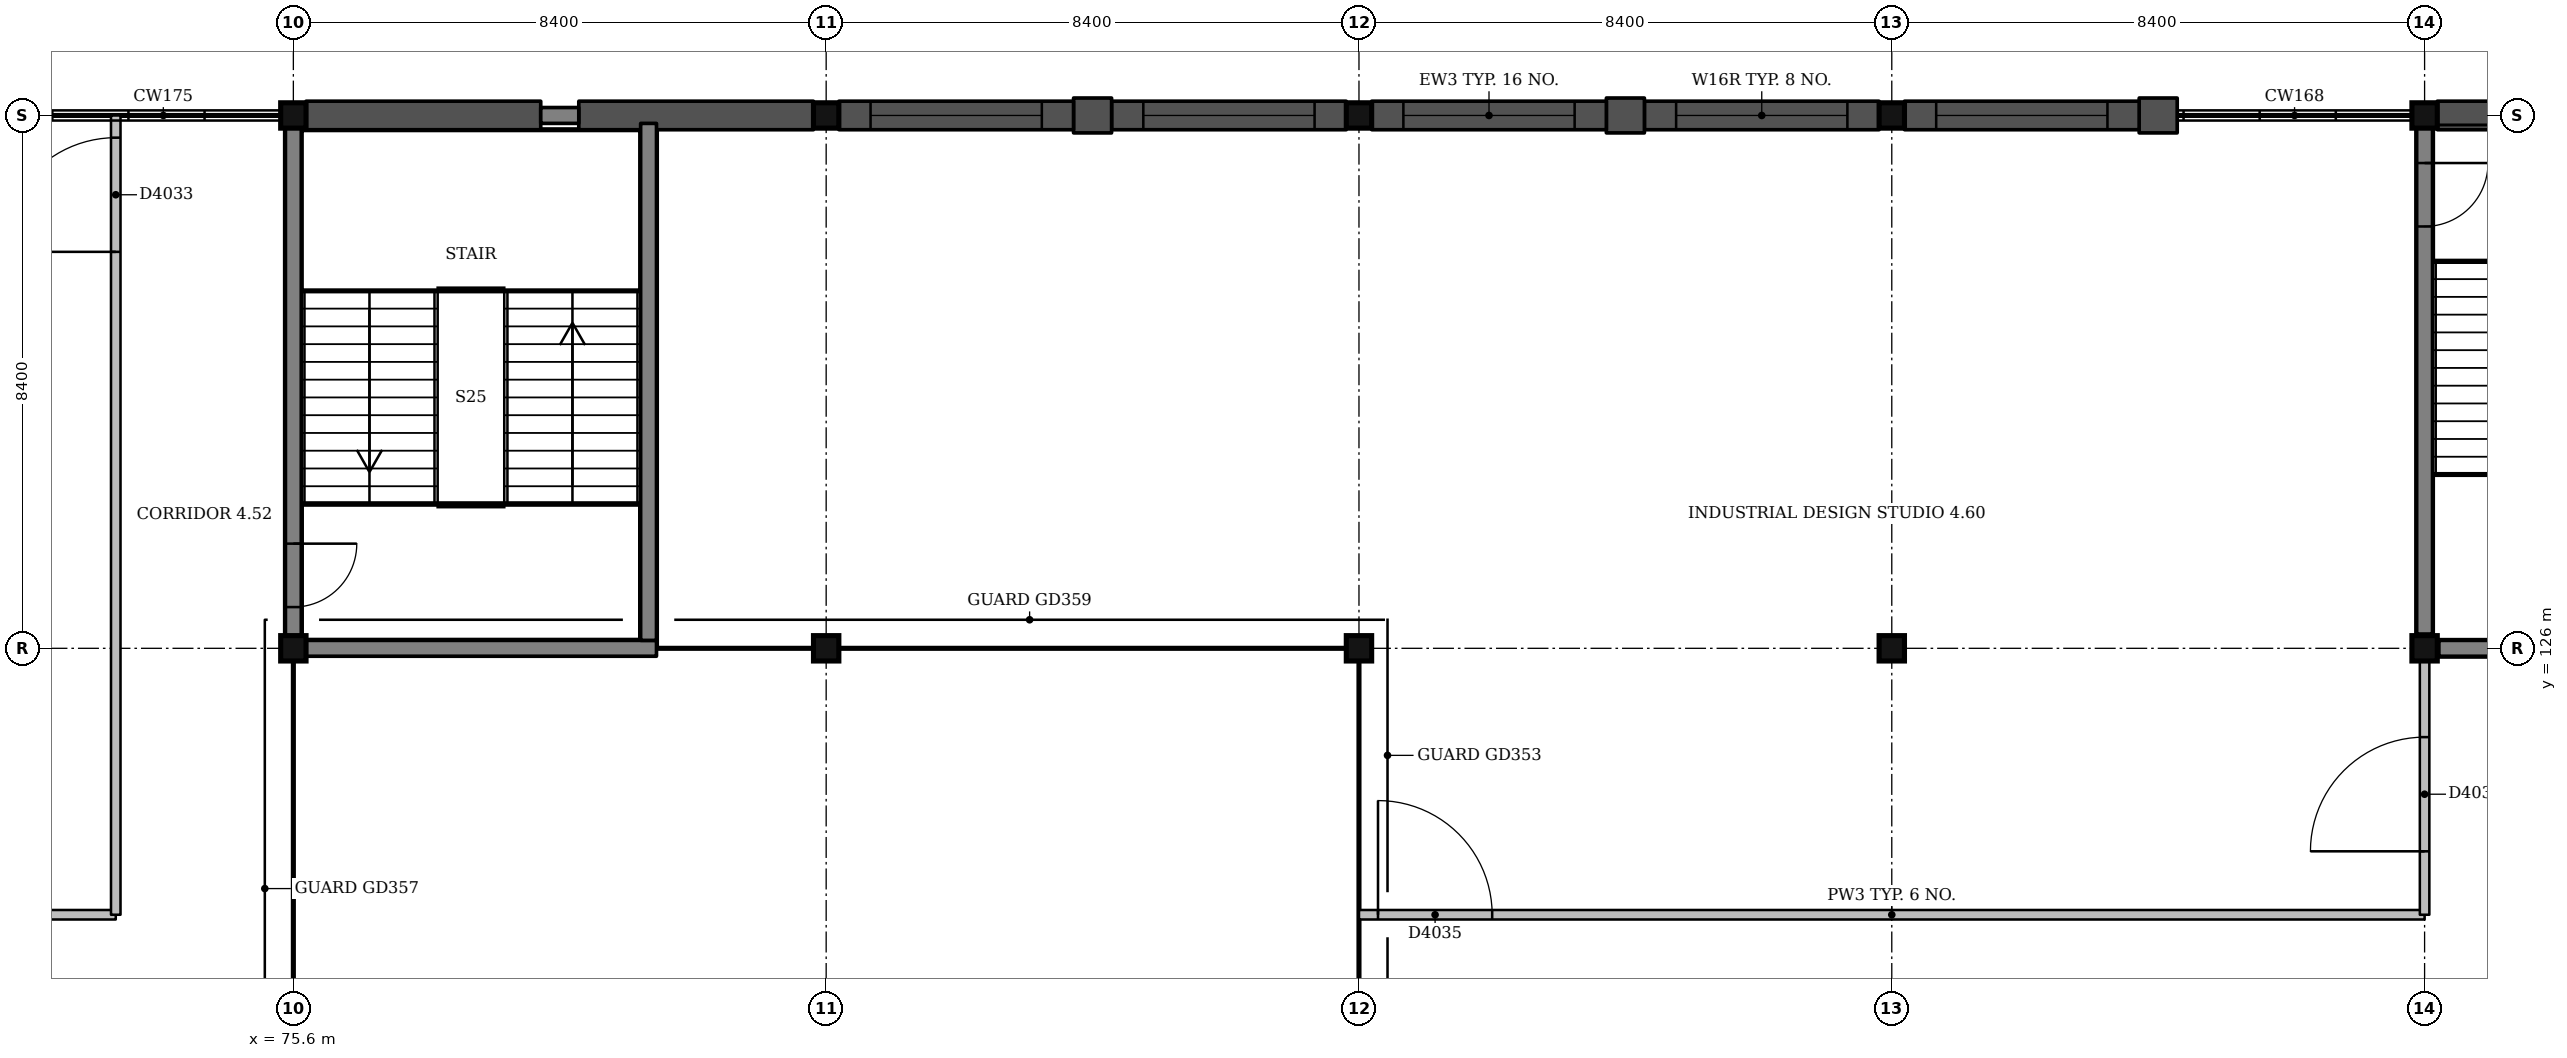
"""IFC4 building model, lengths in metres.
Left out: names, types, materials, properties, quantities, classifications, styles, units other than length and angle.
Written with IfcOpenShell. Run it as: python <this file> out.ifc"""

import sys

from ifc_helpers import new_model, si_unit, direction, frame, frame_2d, origin, origin_2d, place, context, subcontext, project, spatial, rectangle, extrude, element, fill, save


model = new_model("IFC4")
c1 = context("Model", 3, precision=1e-05, world=origin(), true_north=direction((0.0, 1.0)))
c2 = subcontext(c1, "Body", "Model", "MODEL_VIEW")
j1 = project(units=[si_unit("LENGTHUNIT", "METRE"), si_unit("PLANEANGLEUNIT", "RADIAN")], contexts=[c1])
p1 = place(None, origin())
s1 = spatial("IfcSite", under=j1, at=p1, CompositionType="ELEMENT")
p2 = place(p1, origin())
s2 = spatial("IfcBuilding", under=s1, at=p2, CompositionType="ELEMENT")
p3 = place(p2, frame((0.0, 0.0, 18.0)))
s3 = spatial("IfcBuildingStorey", under=s2, at=p3, CompositionType="ELEMENT", Elevation=18.0)
for number, where, z_axis, x_axis in (
    (1, (75.6, 126.0, 0.0), (0.0, 0.0, 1.0), (1.0, 0.0, 0.0)),
    (2, (75.6, 134.4, 0.0), (0.0, 0.0, 1.0), (1.0, 0.0, 0.0)),
    (3, (84.0, 126.0, 0.0), (0.0, 0.0, 1.0), (1.0, 0.0, 0.0)),
    (4, (84.0, 134.4, 0.0), (0.0, 0.0, 1.0), (1.0, 0.0, 0.0)),
    (5, (92.4, 126.0, 0.0), (0.0, 0.0, 1.0), (1.0, 0.0, 0.0)),
    (6, (92.4, 134.4, 0.0), (0.0, 0.0, 1.0), (1.0, 0.0, 0.0)),
    (7, (100.8, 126.0, 0.0), (0.0, 0.0, 1.0), (1.0, 0.0, 0.0)),
    (8, (100.8, 134.4, 0.0), (0.0, 0.0, 1.0), (1.0, 0.0, 0.0)),
    (9, (109.2, 126.0, 0.0), (0.0, 0.0, 1.0), (1.0, 0.0, 0.0)),
    (10, (109.2, 134.4, 0.0), (0.0, 0.0, 1.0), (1.0, 0.0, 0.0)),
):
    element("IfcColumn", number, at=place(p3, frame(where, z_axis=z_axis, x_axis=x_axis)), inside=s3, PredefinedType="COLUMN", context=c2, shape_type="SweptSolid", body=[
        extrude(rectangle(XDim=0.4, YDim=0.4, at=origin_2d()), origin(), (0.0, 0.0, 1.0), 4.5),
    ])
p4 = place(p3, frame((109.425, 126.0, 0.0), z_axis=(0.0, 0.0, 1.0), x_axis=(1.0, 0.0, 0.0)))
e11 = element("IfcWall", 11, at=p4, inside=s3, PredefinedType="SHEAR", context=c2, shape_type="SweptSolid", body=[
    extrude(rectangle(XDim=5.5, YDim=0.25, at=frame_2d((2.75, 0.0))), origin(), (0.0, 0.0, 1.0), 4.5),
])
p5 = place(p3, frame((109.2, 126.225, 0.0), z_axis=(0.0, 0.0, 1.0), x_axis=(0.0, 1.0, 0.0)))
e12 = element("IfcWall", 12, at=p5, inside=s3, PredefinedType="SHEAR", context=c2, shape_type="SweptSolid", body=[
    extrude(rectangle(XDim=7.975, YDim=0.25, at=frame_2d((3.987, 0.0))), origin(), (0.0, 0.0, 1.0), 4.5),
])
p6 = place(p5, frame((6.425, 0.0, 0.0)))
e13 = element("IfcOpeningElement", 13, at=p6, cuts=e12, PredefinedType="OPENING", context=c2, shape_type="SweptSolid", body=[
    extrude(rectangle(XDim=1.0, YDim=2.1, at=frame_2d((0.5, 1.05))), frame((0.0, 0.135, 0.0), z_axis=(0.0, -1.0, 0.0), x_axis=(1.0, 0.0, 0.0)), (0.0, 0.0, 1.0), 0.27),
])
p7 = place(p3, frame((75.8, 126.0, 0.0), z_axis=(0.0, 0.0, 1.0), x_axis=(1.0, 0.0, 0.0)))
e14 = element("IfcWall", 14, at=p7, inside=s3, PredefinedType="SHEAR", context=c2, shape_type="SweptSolid", body=[
    extrude(rectangle(XDim=5.525, YDim=0.25, at=frame_2d((2.762, 0.0))), origin(), (0.0, 0.0, 1.0), 4.5),
])
p8 = place(p3, frame((75.6, 126.2, 0.0), z_axis=(0.0, 0.0, 1.0), x_axis=(0.0, 1.0, 0.0)))
e15 = element("IfcWall", 15, at=p8, inside=s3, PredefinedType="SHEAR", context=c2, shape_type="SweptSolid", body=[
    extrude(rectangle(XDim=8.0, YDim=0.25, at=frame_2d((4.0, 0.0))), origin(), (0.0, 0.0, 1.0), 4.5),
])
p9 = place(p8, frame((0.45, 0.0, 0.0)))
e16 = element("IfcOpeningElement", 16, at=p9, cuts=e15, PredefinedType="OPENING", context=c2, shape_type="SweptSolid", body=[
    extrude(rectangle(XDim=1.0, YDim=2.1, at=frame_2d((0.5, 1.05))), frame((0.0, 0.135, 0.0), z_axis=(0.0, -1.0, 0.0), x_axis=(1.0, 0.0, 0.0)), (0.0, 0.0, 1.0), 0.27),
])
p10 = place(p3, frame((81.2, 126.125, 0.0), z_axis=(0.0, 0.0, 1.0), x_axis=(0.0, 1.0, 0.0)))
e17 = element("IfcWall", 17, at=p10, inside=s3, PredefinedType="SHEAR", context=c2, shape_type="SweptSolid", body=[
    extrude(rectangle(XDim=8.15, YDim=0.25, at=frame_2d((4.075, 0.0))), origin(), (0.0, 0.0, 1.0), 4.5),
])
p11 = place(p3, frame((113.1, 134.4, 0.0), z_axis=(0.0, 0.0, 1.0), x_axis=(-1.0, 0.0, 0.0)))
e18 = element("IfcWall", 18, at=p11, inside=s3, PredefinedType="SOLIDWALL", context=c2, shape_type="SweptSolid", body=[
    extrude(rectangle(XDim=3.7, YDim=0.45, at=frame_2d((1.85, 0.0))), origin(), (0.0, 0.0, 1.0), 3.45),
])
p12 = place(p3, frame((105.3, 134.4, 0.0), z_axis=(0.0, 0.0, 1.0), x_axis=(-1.0, 0.0, 0.0)))
e19 = element("IfcWall", 19, at=p12, inside=s3, PredefinedType="SOLIDWALL", context=c2, shape_type="SweptSolid", body=[
    extrude(rectangle(XDim=0.6, YDim=0.55, at=frame_2d((0.3, 0.0))), origin(), (0.0, 0.0, 1.0), 3.45),
])
p13 = place(p3, frame((104.7, 134.4, 0.0), z_axis=(0.0, 0.0, 1.0), x_axis=(-1.0, 0.0, 0.0)))
e20 = element("IfcWall", 20, at=p13, inside=s3, PredefinedType="SOLIDWALL", context=c2, shape_type="SweptSolid", body=[
    extrude(rectangle(XDim=3.7, YDim=0.45, at=frame_2d((1.85, 0.0))), origin(), (0.0, 0.0, 1.0), 3.45),
])
p14 = place(p13, frame((0.5, 0.0, 0.6)))
e21 = element("IfcOpeningElement", 21, at=p14, cuts=e20, PredefinedType="OPENING", context=c2, shape_type="SweptSolid", body=[
    extrude(rectangle(XDim=2.7, YDim=2.4, at=frame_2d((1.35, 1.2))), frame((0.0, 0.235, 0.0), z_axis=(0.0, -1.0, 0.0), x_axis=(1.0, 0.0, 0.0)), (0.0, 0.0, 1.0), 0.47),
])
p15 = place(p3, frame((100.6, 134.4, 0.0), z_axis=(0.0, 0.0, 1.0), x_axis=(-1.0, 0.0, 0.0)))
e22 = element("IfcWall", 22, at=p15, inside=s3, PredefinedType="SOLIDWALL", context=c2, shape_type="SweptSolid", body=[
    extrude(rectangle(XDim=3.7, YDim=0.45, at=frame_2d((1.85, 0.0))), origin(), (0.0, 0.0, 1.0), 3.45),
])
p16 = place(p15, frame((0.5, 0.0, 0.6)))
e23 = element("IfcOpeningElement", 23, at=p16, cuts=e22, PredefinedType="OPENING", context=c2, shape_type="SweptSolid", body=[
    extrude(rectangle(XDim=2.7, YDim=2.4, at=frame_2d((1.35, 1.2))), frame((0.0, 0.235, 0.0), z_axis=(0.0, -1.0, 0.0), x_axis=(1.0, 0.0, 0.0)), (0.0, 0.0, 1.0), 0.47),
])
p17 = place(p3, frame((96.9, 134.4, 0.0), z_axis=(0.0, 0.0, 1.0), x_axis=(-1.0, 0.0, 0.0)))
e24 = element("IfcWall", 24, at=p17, inside=s3, PredefinedType="SOLIDWALL", context=c2, shape_type="SweptSolid", body=[
    extrude(rectangle(XDim=0.6, YDim=0.55, at=frame_2d((0.3, 0.0))), origin(), (0.0, 0.0, 1.0), 3.45),
])
p18 = place(p3, frame((96.3, 134.4, 0.0), z_axis=(0.0, 0.0, 1.0), x_axis=(-1.0, 0.0, 0.0)))
e25 = element("IfcWall", 25, at=p18, inside=s3, PredefinedType="SOLIDWALL", context=c2, shape_type="SweptSolid", body=[
    extrude(rectangle(XDim=3.7, YDim=0.45, at=frame_2d((1.85, 0.0))), origin(), (0.0, 0.0, 1.0), 3.45),
])
p19 = place(p18, frame((0.5, 0.0, 0.6)))
e26 = element("IfcOpeningElement", 26, at=p19, cuts=e25, PredefinedType="OPENING", context=c2, shape_type="SweptSolid", body=[
    extrude(rectangle(XDim=2.7, YDim=2.4, at=frame_2d((1.35, 1.2))), frame((0.0, 0.235, 0.0), z_axis=(0.0, -1.0, 0.0), x_axis=(1.0, 0.0, 0.0)), (0.0, 0.0, 1.0), 0.47),
])
p20 = place(p3, frame((92.2, 134.4, 0.0), z_axis=(0.0, 0.0, 1.0), x_axis=(-1.0, 0.0, 0.0)))
e27 = element("IfcWall", 27, at=p20, inside=s3, PredefinedType="SOLIDWALL", context=c2, shape_type="SweptSolid", body=[
    extrude(rectangle(XDim=3.7, YDim=0.45, at=frame_2d((1.85, 0.0))), origin(), (0.0, 0.0, 1.0), 3.45),
])
p21 = place(p20, frame((0.5, 0.0, 0.6)))
e28 = element("IfcOpeningElement", 28, at=p21, cuts=e27, PredefinedType="OPENING", context=c2, shape_type="SweptSolid", body=[
    extrude(rectangle(XDim=2.7, YDim=2.4, at=frame_2d((1.35, 1.2))), frame((0.0, 0.235, 0.0), z_axis=(0.0, -1.0, 0.0), x_axis=(1.0, 0.0, 0.0)), (0.0, 0.0, 1.0), 0.47),
])
p22 = place(p3, frame((88.5, 134.4, 0.0), z_axis=(0.0, 0.0, 1.0), x_axis=(-1.0, 0.0, 0.0)))
e29 = element("IfcWall", 29, at=p22, inside=s3, PredefinedType="SOLIDWALL", context=c2, shape_type="SweptSolid", body=[
    extrude(rectangle(XDim=0.6, YDim=0.55, at=frame_2d((0.3, 0.0))), origin(), (0.0, 0.0, 1.0), 3.45),
])
p23 = place(p3, frame((87.9, 134.4, 0.0), z_axis=(0.0, 0.0, 1.0), x_axis=(-1.0, 0.0, 0.0)))
e30 = element("IfcWall", 30, at=p23, inside=s3, PredefinedType="SOLIDWALL", context=c2, shape_type="SweptSolid", body=[
    extrude(rectangle(XDim=3.7, YDim=0.45, at=frame_2d((1.85, 0.0))), origin(), (0.0, 0.0, 1.0), 3.45),
])
p24 = place(p23, frame((0.5, 0.0, 0.6)))
e31 = element("IfcOpeningElement", 31, at=p24, cuts=e30, PredefinedType="OPENING", context=c2, shape_type="SweptSolid", body=[
    extrude(rectangle(XDim=2.7, YDim=2.4, at=frame_2d((1.35, 1.2))), frame((0.0, 0.235, 0.0), z_axis=(0.0, -1.0, 0.0), x_axis=(1.0, 0.0, 0.0)), (0.0, 0.0, 1.0), 0.47),
])
for number, where, z_axis, x_axis in (
    (32, (83.8, 134.4, 0.0), (0.0, 0.0, 1.0), (-1.0, 0.0, 0.0)),
    (33, (79.5, 134.4, 0.0), (0.0, 0.0, 1.0), (-1.0, 0.0, 0.0)),
):
    element("IfcWall", number, at=place(p3, frame(where, z_axis=z_axis, x_axis=x_axis)), inside=s3, PredefinedType="SOLIDWALL", context=c2, shape_type="SweptSolid", body=[
        extrude(rectangle(XDim=3.7, YDim=0.45, at=frame_2d((1.85, 0.0))), origin(), (0.0, 0.0, 1.0), 3.45),
    ])
p25 = place(p3, frame((44.8, 121.8, 0.0), z_axis=(0.0, 0.0, 1.0), x_axis=(1.0, 0.0, 0.0)))
e34 = element("IfcWall", 34, at=p25, inside=s3, PredefinedType="PARTITIONING", context=c2, shape_type="SweptSolid", body=[
    extrude(rectangle(XDim=28.0, YDim=0.15, at=frame_2d((14.0, 0.0))), origin(), (0.0, 0.0, 1.0), 3.35),
])
p26 = place(p25, frame((0.3, 0.0, 0.0)))
e35 = element("IfcOpeningElement", 35, at=p26, cuts=e34, PredefinedType="OPENING", context=c2, shape_type="SweptSolid", body=[
    extrude(rectangle(XDim=1.8, YDim=2.1, at=frame_2d((0.9, 1.05))), frame((0.0, 0.085, 0.0), z_axis=(0.0, -1.0, 0.0), x_axis=(1.0, 0.0, 0.0)), (0.0, 0.0, 1.0), 0.17),
])
p27 = place(p25, frame((20.25, 0.0, 0.0)))
e36 = element("IfcOpeningElement", 36, at=p27, cuts=e34, PredefinedType="OPENING", context=c2, shape_type="SweptSolid", body=[
    extrude(rectangle(XDim=1.8, YDim=2.1, at=frame_2d((0.9, 1.05))), frame((0.0, 0.085, 0.0), z_axis=(0.0, -1.0, 0.0), x_axis=(1.0, 0.0, 0.0)), (0.0, 0.0, 1.0), 0.17),
])
p28 = place(p3, frame((92.4, 121.8, 0.0), z_axis=(0.0, 0.0, 1.0), x_axis=(1.0, 0.0, 0.0)))
e37 = element("IfcWall", 37, at=p28, inside=s3, PredefinedType="PARTITIONING", context=c2, shape_type="SweptSolid", body=[
    extrude(rectangle(XDim=16.8, YDim=0.15, at=frame_2d((8.4, 0.0))), origin(), (0.0, 0.0, 1.0), 3.45),
])
p29 = place(p28, frame((0.3, 0.0, 0.0)))
e38 = element("IfcOpeningElement", 38, at=p29, cuts=e37, PredefinedType="OPENING", context=c2, shape_type="SweptSolid", body=[
    extrude(rectangle(XDim=1.8, YDim=2.1, at=frame_2d((0.9, 1.05))), frame((0.0, 0.085, 0.0), z_axis=(0.0, -1.0, 0.0), x_axis=(1.0, 0.0, 0.0)), (0.0, 0.0, 1.0), 0.17),
])
p30 = place(p3, frame((72.8, 121.8, 0.0), z_axis=(0.0, 0.0, 1.0), x_axis=(0.0, 1.0, 0.0)))
e39 = element("IfcWall", 39, at=p30, inside=s3, PredefinedType="PARTITIONING", context=c2, shape_type="SweptSolid", body=[
    extrude(rectangle(XDim=12.6, YDim=0.15, at=frame_2d((6.3, 0.0))), origin(), (0.0, 0.0, 1.0), 2.37),
])
p31 = place(p30, frame((10.45, 0.0, 0.0)))
e40 = element("IfcOpeningElement", 40, at=p31, cuts=e39, PredefinedType="OPENING", context=c2, shape_type="SweptSolid", body=[
    extrude(rectangle(XDim=1.8, YDim=2.1, at=frame_2d((0.9, 1.05))), frame((0.0, 0.085, 0.0), z_axis=(0.0, -1.0, 0.0), x_axis=(1.0, 0.0, 0.0)), (0.0, 0.0, 1.0), 0.17),
])
p32 = place(p3, frame((109.2, 121.8, 0.0), z_axis=(0.0, 0.0, 1.0), x_axis=(0.0, 1.0, 0.0)))
e41 = element("IfcWall", 41, at=p32, inside=s3, PredefinedType="PARTITIONING", context=c2, shape_type="SweptSolid", body=[
    extrude(rectangle(XDim=4.0, YDim=0.15, at=frame_2d((2.0, 0.0))), origin(), (0.0, 0.0, 1.0), 3.5),
])
p33 = place(p32, frame((1.0, 0.0, 0.0)))
e42 = element("IfcOpeningElement", 42, at=p33, cuts=e41, PredefinedType="OPENING", context=c2, shape_type="SweptSolid", body=[
    extrude(rectangle(XDim=1.8, YDim=2.1, at=frame_2d((0.9, 1.05))), frame((0.0, 0.085, 0.0), z_axis=(0.0, -1.0, 0.0), x_axis=(1.0, 0.0, 0.0)), (0.0, 0.0, 1.0), 0.17),
])
p34 = place(p3, frame((79.5, 134.4, 0.0), z_axis=(0.0, 0.0, 1.0), x_axis=(1.0, 0.0, 0.0)))
e43 = element("IfcWall", 43, at=p34, inside=s3, PredefinedType="SHEAR", context=c2, shape_type="SweptSolid", body=[
    extrude(rectangle(XDim=0.6, YDim=0.25, at=frame_2d((0.3, 0.0))), origin(), (0.0, 0.0, 1.0), 4.5),
])
p35 = place(p14, origin())
e44 = element("IfcWindow", 44, at=p35, inside=s3, PartitioningType="SINGLE_PANEL", PredefinedType="WINDOW", context=c2, shape_type="SweptSolid", body=[
    extrude(rectangle(XDim=2.7, YDim=2.4, at=frame_2d((1.35, 1.2))), frame((0.0, 0.135, 0.0), z_axis=(0.0, -1.0, 0.0), x_axis=(1.0, 0.0, 0.0)), (0.0, 0.0, 1.0), 0.06),
])
fill(e21, e44)
p36 = place(p16, origin())
e45 = element("IfcWindow", 45, at=p36, inside=s3, PartitioningType="SINGLE_PANEL", PredefinedType="WINDOW", context=c2, shape_type="SweptSolid", body=[
    extrude(rectangle(XDim=2.7, YDim=2.4, at=frame_2d((1.35, 1.2))), frame((0.0, 0.135, 0.0), z_axis=(0.0, -1.0, 0.0), x_axis=(1.0, 0.0, 0.0)), (0.0, 0.0, 1.0), 0.06),
])
fill(e23, e45)
p37 = place(p19, origin())
e46 = element("IfcWindow", 46, at=p37, inside=s3, PartitioningType="SINGLE_PANEL", PredefinedType="WINDOW", context=c2, shape_type="SweptSolid", body=[
    extrude(rectangle(XDim=2.7, YDim=2.4, at=frame_2d((1.35, 1.2))), frame((0.0, 0.135, 0.0), z_axis=(0.0, -1.0, 0.0), x_axis=(1.0, 0.0, 0.0)), (0.0, 0.0, 1.0), 0.06),
])
fill(e26, e46)
p38 = place(p21, origin())
e47 = element("IfcWindow", 47, at=p38, inside=s3, PartitioningType="SINGLE_PANEL", PredefinedType="WINDOW", context=c2, shape_type="SweptSolid", body=[
    extrude(rectangle(XDim=2.7, YDim=2.4, at=frame_2d((1.35, 1.2))), frame((0.0, 0.135, 0.0), z_axis=(0.0, -1.0, 0.0), x_axis=(1.0, 0.0, 0.0)), (0.0, 0.0, 1.0), 0.06),
])
fill(e28, e47)
p39 = place(p24, origin())
e48 = element("IfcWindow", 48, at=p39, inside=s3, PartitioningType="SINGLE_PANEL", PredefinedType="WINDOW", context=c2, shape_type="SweptSolid", body=[
    extrude(rectangle(XDim=2.7, YDim=2.4, at=frame_2d((1.35, 1.2))), frame((0.0, 0.135, 0.0), z_axis=(0.0, -1.0, 0.0), x_axis=(1.0, 0.0, 0.0)), (0.0, 0.0, 1.0), 0.06),
])
fill(e31, e48)
p40 = place(p31, origin())
e49 = element("IfcDoor", 49, at=p40, inside=s3, OperationType="DOUBLE_DOOR_SINGLE_SWING", PredefinedType="DOOR", context=c2, shape_type="SweptSolid", body=[
    extrude(rectangle(XDim=1.8, YDim=2.1, at=frame_2d((0.9, 1.05))), frame((0.0, 0.025, 0.0), z_axis=(0.0, -1.0, 0.0), x_axis=(1.0, 0.0, 0.0)), (0.0, 0.0, 1.0), 0.05),
])
fill(e40, e49)
p41 = place(p33, origin())
e50 = element("IfcDoor", 50, at=p41, inside=s3, OperationType="DOUBLE_DOOR_SINGLE_SWING", PredefinedType="DOOR", context=c2, shape_type="SweptSolid", body=[
    extrude(rectangle(XDim=1.8, YDim=2.1, at=frame_2d((0.9, 1.05))), frame((0.0, 0.025, 0.0), z_axis=(0.0, -1.0, 0.0), x_axis=(1.0, 0.0, 0.0)), (0.0, 0.0, 1.0), 0.05),
])
fill(e42, e50)
p42 = place(p29, origin())
e51 = element("IfcDoor", 51, at=p42, inside=s3, OperationType="DOUBLE_DOOR_SINGLE_SWING", PredefinedType="DOOR", context=c2, shape_type="SweptSolid", body=[
    extrude(rectangle(XDim=1.8, YDim=2.1, at=frame_2d((0.9, 1.05))), frame((0.0, 0.025, 0.0), z_axis=(0.0, -1.0, 0.0), x_axis=(1.0, 0.0, 0.0)), (0.0, 0.0, 1.0), 0.05),
])
fill(e38, e51)
p43 = place(p6, origin())
e52 = element("IfcDoor", 52, at=p43, inside=s3, OperationType="SINGLE_SWING_RIGHT", PredefinedType="DOOR", context=c2, shape_type="SweptSolid", body=[
    extrude(rectangle(XDim=1.0, YDim=2.1, at=frame_2d((0.5, 1.05))), frame((0.0, 0.025, 0.0), z_axis=(0.0, -1.0, 0.0), x_axis=(1.0, 0.0, 0.0)), (0.0, 0.0, 1.0), 0.05),
])
fill(e13, e52)
p44 = place(p9, origin())
e53 = element("IfcDoor", 53, at=p44, inside=s3, OperationType="SINGLE_SWING_RIGHT", PredefinedType="DOOR", context=c2, shape_type="SweptSolid", body=[
    extrude(rectangle(XDim=1.0, YDim=2.1, at=frame_2d((0.5, 1.05))), frame((0.0, 0.025, 0.0), z_axis=(0.0, -1.0, 0.0), x_axis=(1.0, 0.0, 0.0)), (0.0, 0.0, 1.0), 0.05),
])
fill(e16, e53)
save(model, sys.argv[1])
